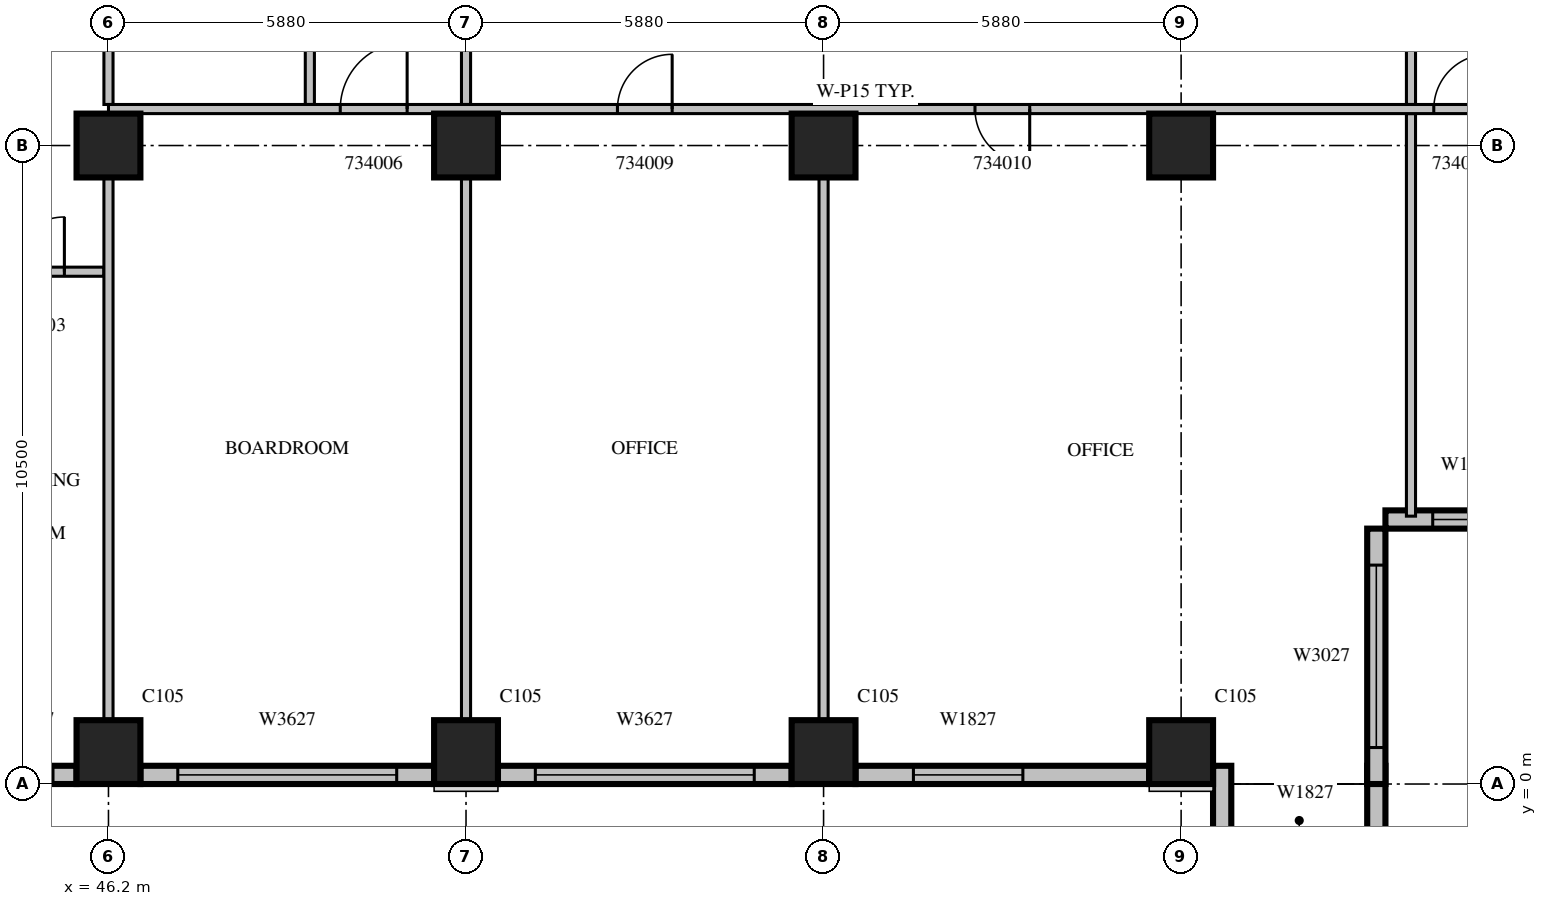
"""IFC4 building model, lengths in metres.
Left out: names, types, materials, properties, quantities, classifications, styles, units other than length and angle.
Written with IfcOpenShell. Run it as: python <this file> out.ifc"""

import sys

from ifc_helpers import new_model, si_unit, direction, frame, frame_2d, origin, origin_2d, place, context, subcontext, project, spatial, rectangle, extrude, source, transform, mapped, element, fill, save


model = new_model("IFC4")
c1 = context("Model", 3, precision=1e-05, world=origin(), true_north=direction((0.0, 1.0)))
c2 = subcontext(c1, "Body", "Model", "MODEL_VIEW")
j1 = project(units=[si_unit("LENGTHUNIT", "METRE"), si_unit("PLANEANGLEUNIT", "RADIAN")], contexts=[c1])
p1 = place(None, origin())
s1 = spatial("IfcSite", under=j1, at=p1, CompositionType="ELEMENT")
p2 = place(p1, origin())
s2 = spatial("IfcBuilding", under=s1, at=p2, CompositionType="ELEMENT")
p3 = place(p2, frame((0.0, 0.0, 153.9)))
s3 = spatial("IfcBuildingStorey", under=s2, at=p3, CompositionType="ELEMENT", Elevation=153.9)
m1 = source(origin(), c2, "Body", "SweptSolid", [
    extrude(rectangle(XDim=1.05, YDim=1.05, at=origin_2d()), origin(), (0.0, 0.0, 1.0), 4.2),
])
for number, where, z_axis, x_axis in (
    (1, (46.2, 0.525, 0.0), (0.0, 0.0, 1.0), (1.0, 0.0, 0.0)),
    (2, (52.08, 0.525, 0.0), (0.0, 0.0, 1.0), (1.0, 0.0, 0.0)),
    (3, (57.96, 0.525, 0.0), (0.0, 0.0, 1.0), (1.0, 0.0, 0.0)),
    (4, (63.84, 0.525, 0.0), (0.0, 0.0, 1.0), (1.0, 0.0, 0.0)),
    (5, (46.2, 10.5, 0.0), (0.0, 0.0, 1.0), (1.0, 0.0, 0.0)),
    (6, (52.08, 10.5, 0.0), (0.0, 0.0, 1.0), (1.0, 0.0, 0.0)),
    (7, (57.96, 10.5, 0.0), (0.0, 0.0, 1.0), (1.0, 0.0, 0.0)),
    (8, (63.84, 10.5, 0.0), (0.0, 0.0, 1.0), (1.0, 0.0, 0.0)),
):
    element("IfcColumn", number, at=place(p3, frame(where, z_axis=z_axis, x_axis=x_axis)), inside=s3, PredefinedType="COLUMN", context=c2, shape_type="MappedRepresentation", body=[
        mapped(m1, transform((0.0, 0.0, 0.0), scale=1.0)),
    ])
m2 = source(origin(), c2, "Body", "SweptSolid", [
    extrude(rectangle(XDim=1.675, YDim=0.3, at=frame_2d((0.838, 0.0))), origin(), (0.0, 0.0, 1.0), 3.8),
])
p4 = place(p3, frame((44.0, 0.15, 0.0), z_axis=(0.0, 0.0, 1.0), x_axis=(1.0, 0.0, 0.0)))
e9 = element("IfcWall", 9, at=p4, inside=s3, PredefinedType="STANDARD", context=c2, shape_type="MappedRepresentation", body=[
    mapped(m2, transform((0.0, 0.0, 0.0), scale=1.0)),
])
m3 = source(origin(), c2, "Body", "SweptSolid", [
    extrude(rectangle(XDim=0.9, YDim=2.7, at=frame_2d((0.45, 1.35))), frame((0.0, 0.16, 0.0), z_axis=(0.0, -1.0, 0.0), x_axis=(1.0, 0.0, 0.0)), (0.0, 0.0, 1.0), 0.32),
])
p5 = place(p4, frame((0.388, 0.0, 0.6)))
e10 = element("IfcOpeningElement", 10, at=p5, cuts=e9, PredefinedType="OPENING", context=c2, shape_type="MappedRepresentation", body=[
    mapped(m3, transform((0.0, 0.0, 0.0), scale=1.0)),
])
m4 = source(origin(), c2, "Body", "SweptSolid", [
    extrude(rectangle(XDim=4.83, YDim=0.3, at=frame_2d((2.415, 0.0))), origin(), (0.0, 0.0, 1.0), 3.8),
])
p6 = place(p3, frame((46.725, 0.15, 0.0), z_axis=(0.0, 0.0, 1.0), x_axis=(1.0, 0.0, 0.0)))
e11 = element("IfcWall", 11, at=p6, inside=s3, PredefinedType="STANDARD", context=c2, shape_type="MappedRepresentation", body=[
    mapped(m4, transform((0.0, 0.0, 0.0), scale=1.0)),
])
m5 = source(origin(), c2, "Body", "SweptSolid", [
    extrude(rectangle(XDim=3.6, YDim=2.7, at=frame_2d((1.8, 1.35))), frame((0.0, 0.16, 0.0), z_axis=(0.0, -1.0, 0.0), x_axis=(1.0, 0.0, 0.0)), (0.0, 0.0, 1.0), 0.32),
])
p7 = place(p6, frame((0.615, 0.0, 0.6)))
e12 = element("IfcOpeningElement", 12, at=p7, cuts=e11, PredefinedType="OPENING", context=c2, shape_type="MappedRepresentation", body=[
    mapped(m5, transform((0.0, 0.0, 0.0), scale=1.0)),
])
p8 = place(p3, frame((52.605, 0.15, 0.0), z_axis=(0.0, 0.0, 1.0), x_axis=(1.0, 0.0, 0.0)))
e13 = element("IfcWall", 13, at=p8, inside=s3, PredefinedType="STANDARD", context=c2, shape_type="MappedRepresentation", body=[
    mapped(m4, transform((0.0, 0.0, 0.0), scale=1.0)),
])
p9 = place(p8, frame((0.615, 0.0, 0.6)))
e14 = element("IfcOpeningElement", 14, at=p9, cuts=e13, PredefinedType="OPENING", context=c2, shape_type="MappedRepresentation", body=[
    mapped(m5, transform((0.0, 0.0, 0.0), scale=1.0)),
])
p10 = place(p3, frame((58.485, 0.15, 0.0), z_axis=(0.0, 0.0, 1.0), x_axis=(1.0, 0.0, 0.0)))
e15 = element("IfcWall", 15, at=p10, inside=s3, PredefinedType="STANDARD", context=c2, shape_type="MappedRepresentation", body=[
    mapped(m4, transform((0.0, 0.0, 0.0), scale=1.0)),
])
m6 = source(origin(), c2, "Body", "SweptSolid", [
    extrude(rectangle(XDim=1.8, YDim=2.7, at=frame_2d((0.9, 1.35))), frame((0.0, 0.16, 0.0), z_axis=(0.0, -1.0, 0.0), x_axis=(1.0, 0.0, 0.0)), (0.0, 0.0, 1.0), 0.32),
])
p11 = place(p10, frame((0.953, 0.0, 0.6)))
e16 = element("IfcOpeningElement", 16, at=p11, cuts=e15, PredefinedType="OPENING", context=c2, shape_type="MappedRepresentation", body=[
    mapped(m6, transform((0.0, 0.0, 0.0), scale=1.0)),
])
m7 = source(origin(), c2, "Body", "SweptSolid", [
    extrude(rectangle(XDim=1.2, YDim=0.3, at=frame_2d((0.6, 0.0))), origin(), (0.0, 0.0, 1.0), 3.8),
])
for number, where, z_axis, x_axis in (
    (17, (64.515, 0.3, 0.0), (0.0, 0.0, 1.0), (0.0, -1.0, 0.0)),
    (18, (67.05, 0.3, 0.0), (0.0, 0.0, 1.0), (0.0, -1.0, 0.0)),
):
    element("IfcWall", number, at=place(p3, frame(where, z_axis=z_axis, x_axis=x_axis)), inside=s3, PredefinedType="STANDARD", context=c2, shape_type="MappedRepresentation", body=[
        mapped(m7, transform((0.0, 0.0, 0.0), scale=1.0)),
    ])
m8 = source(origin(), c2, "Body", "SweptSolid", [
    extrude(rectangle(XDim=4.2, YDim=0.3, at=frame_2d((2.1, 0.0))), origin(), (0.0, 0.0, 1.0), 3.8),
])
p12 = place(p3, frame((67.05, 0.0, 0.0), z_axis=(0.0, 0.0, 1.0), x_axis=(0.0, 1.0, 0.0)))
e19 = element("IfcWall", 19, at=p12, inside=s3, PredefinedType="STANDARD", context=c2, shape_type="MappedRepresentation", body=[
    mapped(m8, transform((0.0, 0.0, 0.0), scale=1.0)),
])
m9 = source(origin(), c2, "Body", "SweptSolid", [
    extrude(rectangle(XDim=3.0, YDim=2.7, at=frame_2d((1.5, 1.35))), frame((0.0, 0.16, 0.0), z_axis=(0.0, -1.0, 0.0), x_axis=(1.0, 0.0, 0.0)), (0.0, 0.0, 1.0), 0.32),
])
p13 = place(p12, frame((0.6, 0.0, 0.6)))
e20 = element("IfcOpeningElement", 20, at=p13, cuts=e19, PredefinedType="OPENING", context=c2, shape_type="MappedRepresentation", body=[
    mapped(m9, transform((0.0, 0.0, 0.0), scale=1.0)),
])
m10 = source(origin(), c2, "Body", "SweptSolid", [
    extrude(rectangle(XDim=2.52, YDim=0.3, at=frame_2d((1.26, 0.0))), origin(), (0.0, 0.0, 1.0), 3.8),
])
p14 = place(p3, frame((67.2, 4.35, 0.0), z_axis=(0.0, 0.0, 1.0), x_axis=(1.0, 0.0, 0.0)))
e21 = element("IfcWall", 21, at=p14, inside=s3, PredefinedType="STANDARD", context=c2, shape_type="MappedRepresentation", body=[
    mapped(m10, transform((0.0, 0.0, 0.0), scale=1.0)),
])
m11 = source(origin(), c2, "Body", "SweptSolid", [
    extrude(rectangle(XDim=1.2, YDim=2.7, at=frame_2d((0.6, 1.35))), frame((0.0, 0.16, 0.0), z_axis=(0.0, -1.0, 0.0), x_axis=(1.0, 0.0, 0.0)), (0.0, 0.0, 1.0), 0.32),
])
p15 = place(p14, frame((0.777, 0.0, 0.6)))
e22 = element("IfcOpeningElement", 22, at=p15, cuts=e21, PredefinedType="OPENING", context=c2, shape_type="MappedRepresentation", body=[
    mapped(m11, transform((0.0, 0.0, 0.0), scale=1.0)),
])
m12 = source(origin(), c2, "Body", "SweptSolid", [
    extrude(rectangle(XDim=2.2, YDim=0.15, at=frame_2d((1.1, 0.0))), origin(), (0.0, 0.0, 1.0), 3.8),
])
p16 = place(p3, frame((46.125, 8.425, 0.0), z_axis=(0.0, 0.0, 1.0), x_axis=(-1.0, 0.0, 0.0)))
e23 = element("IfcWall", 23, at=p16, inside=s3, PredefinedType="PARTITIONING", context=c2, shape_type="MappedRepresentation", body=[
    mapped(m12, transform((0.0, 0.0, 0.0), scale=1.0)),
])
m13 = source(origin(), c2, "Body", "SweptSolid", [
    extrude(rectangle(XDim=0.9, YDim=2.1, at=frame_2d((0.45, 1.05))), frame((0.0, 0.085, 0.0), z_axis=(0.0, -1.0, 0.0), x_axis=(1.0, 0.0, 0.0)), (0.0, 0.0, 1.0), 0.17),
])
p17 = place(p16, frame((0.65, 0.0, 0.0)))
e24 = element("IfcOpeningElement", 24, at=p17, cuts=e23, PredefinedType="OPENING", context=c2, shape_type="MappedRepresentation", body=[
    mapped(m13, transform((0.0, 0.0, 0.0), scale=1.0)),
])
m14 = source(origin(), c2, "Body", "SweptSolid", [
    extrude(rectangle(XDim=3.825, YDim=0.15, at=frame_2d((1.913, 0.0))), origin(), (0.0, 0.0, 1.0), 3.8),
])
p18 = place(p3, frame((49.512, 11.175, 0.0), z_axis=(0.0, 0.0, 1.0), x_axis=(0.0, 1.0, 0.0)))
e25 = element("IfcWall", 25, at=p18, inside=s3, PredefinedType="PARTITIONING", context=c2, shape_type="MappedRepresentation", body=[
    mapped(m14, transform((0.0, 0.0, 0.0), scale=1.0)),
])
m15 = source(origin(), c2, "Body", "SweptSolid", [
    extrude(rectangle(XDim=8.927, YDim=0.15, at=frame_2d((4.463, 0.0))), origin(), (0.0, 0.0, 1.0), 3.8),
])
for number, where, z_axis, x_axis in (
    (26, (57.96, 1.049, 0.0), (0.0, 0.0, 1.0), (0.0, 1.0, 0.0)),
    (27, (46.2, 1.049, 0.0), (0.0, 0.0, 1.0), (0.0, 1.0, 0.0)),
):
    element("IfcWall", number, at=place(p3, frame(where, z_axis=z_axis, x_axis=x_axis)), inside=s3, PredefinedType="PARTITIONING", context=c2, shape_type="MappedRepresentation", body=[
        mapped(m15, transform((0.0, 0.0, 0.0), scale=1.0)),
    ])
p19 = place(p3, frame((46.2, 11.175, 0.0), z_axis=(0.0, 0.0, 1.0), x_axis=(0.0, 1.0, 0.0)))
e28 = element("IfcWall", 28, at=p19, inside=s3, PredefinedType="PARTITIONING", context=c2, shape_type="MappedRepresentation", body=[
    mapped(m14, transform((0.0, 0.0, 0.0), scale=1.0)),
])
p20 = place(p3, frame((52.08, 1.049, 0.0), z_axis=(0.0, 0.0, 1.0), x_axis=(0.0, 1.0, 0.0)))
e29 = element("IfcWall", 29, at=p20, inside=s3, PredefinedType="PARTITIONING", context=c2, shape_type="MappedRepresentation", body=[
    mapped(m15, transform((0.0, 0.0, 0.0), scale=1.0)),
])
p21 = place(p3, frame((52.08, 11.175, 0.0), z_axis=(0.0, 0.0, 1.0), x_axis=(0.0, 1.0, 0.0)))
e30 = element("IfcWall", 30, at=p21, inside=s3, PredefinedType="PARTITIONING", context=c2, shape_type="MappedRepresentation", body=[
    mapped(m14, transform((0.0, 0.0, 0.0), scale=1.0)),
])
m16 = source(origin(), c2, "Body", "SweptSolid", [
    extrude(rectangle(XDim=6.62, YDim=0.15, at=frame_2d((3.31, 0.0))), origin(), (0.0, 0.0, 1.0), 3.8),
])
p22 = place(p3, frame((67.62, 4.405, 0.0), z_axis=(0.0, 0.0, 1.0), x_axis=(0.0, 1.0, 0.0)))
e31 = element("IfcWall", 31, at=p22, inside=s3, PredefinedType="PARTITIONING", context=c2, shape_type="MappedRepresentation", body=[
    mapped(m16, transform((0.0, 0.0, 0.0), scale=1.0)),
])
p23 = place(p3, frame((67.62, 11.175, 0.0), z_axis=(0.0, 0.0, 1.0), x_axis=(0.0, 1.0, 0.0)))
e32 = element("IfcWall", 32, at=p23, inside=s3, PredefinedType="PARTITIONING", context=c2, shape_type="MappedRepresentation", body=[
    mapped(m14, transform((0.0, 0.0, 0.0), scale=1.0)),
])
m17 = source(origin(), c2, "Body", "SweptSolid", [
    extrude(rectangle(XDim=24.9, YDim=0.15, at=frame_2d((12.45, 0.0))), origin(), (0.0, 0.0, 1.0), 3.8),
])
p24 = place(p3, frame((71.1, 11.1, 0.0), z_axis=(0.0, 0.0, 1.0), x_axis=(-1.0, 0.0, 0.0)))
e33 = element("IfcWall", 33, at=p24, inside=s3, PredefinedType="PARTITIONING", context=c2, shape_type="MappedRepresentation", body=[
    mapped(m17, transform((0.0, 0.0, 0.0), scale=1.0)),
])
m18 = source(origin(), c2, "Body", "SweptSolid", [
    extrude(rectangle(XDim=1.1, YDim=2.1, at=frame_2d((0.55, 1.05))), frame((0.0, 0.085, 0.0), z_axis=(0.0, -1.0, 0.0), x_axis=(1.0, 0.0, 0.0)), (0.0, 0.0, 1.0), 0.17),
])
p25 = place(p24, frame((19.988, 0.0, 0.0)))
e34 = element("IfcOpeningElement", 34, at=p25, cuts=e33, PredefinedType="OPENING", context=c2, shape_type="MappedRepresentation", body=[
    mapped(m18, transform((0.0, 0.0, 0.0), scale=1.0)),
])
p26 = place(p24, frame((15.63, 0.0, 0.0)))
e35 = element("IfcOpeningElement", 35, at=p26, cuts=e33, PredefinedType="OPENING", context=c2, shape_type="MappedRepresentation", body=[
    mapped(m13, transform((0.0, 0.0, 0.0), scale=1.0)),
])
p27 = place(p24, frame((9.75, 0.0, 0.0)))
e36 = element("IfcOpeningElement", 36, at=p27, cuts=e33, PredefinedType="OPENING", context=c2, shape_type="MappedRepresentation", body=[
    mapped(m13, transform((0.0, 0.0, 0.0), scale=1.0)),
])
p28 = place(p24, frame((2.205, 0.0, 0.0)))
e37 = element("IfcOpeningElement", 37, at=p28, cuts=e33, PredefinedType="OPENING", context=c2, shape_type="MappedRepresentation", body=[
    mapped(m13, transform((0.0, 0.0, 0.0), scale=1.0)),
])
m19 = source(origin(), c2, "Body", "SweptSolid", [
    extrude(rectangle(XDim=0.9, YDim=2.7, at=frame_2d((0.45, 1.35))), frame((0.0, 0.03, 0.0), z_axis=(0.0, -1.0, 0.0), x_axis=(1.0, 0.0, 0.0)), (0.0, 0.0, 1.0), 0.06),
])
p29 = place(p5, origin())
e38 = element("IfcWindow", 38, at=p29, inside=s3, PartitioningType="SINGLE_PANEL", PredefinedType="WINDOW", context=c2, shape_type="MappedRepresentation", body=[
    mapped(m19, transform((0.0, 0.0, 0.0), scale=1.0)),
])
fill(e10, e38)
m20 = source(origin(), c2, "Body", "SweptSolid", [
    extrude(rectangle(XDim=3.6, YDim=2.7, at=frame_2d((1.8, 1.35))), frame((0.0, 0.03, 0.0), z_axis=(0.0, -1.0, 0.0), x_axis=(1.0, 0.0, 0.0)), (0.0, 0.0, 1.0), 0.06),
])
p30 = place(p7, origin())
e39 = element("IfcWindow", 39, at=p30, inside=s3, PartitioningType="SINGLE_PANEL", PredefinedType="WINDOW", context=c2, shape_type="MappedRepresentation", body=[
    mapped(m20, transform((0.0, 0.0, 0.0), scale=1.0)),
])
fill(e12, e39)
p31 = place(p9, origin())
e40 = element("IfcWindow", 40, at=p31, inside=s3, PartitioningType="SINGLE_PANEL", PredefinedType="WINDOW", context=c2, shape_type="MappedRepresentation", body=[
    mapped(m20, transform((0.0, 0.0, 0.0), scale=1.0)),
])
fill(e14, e40)
m21 = source(origin(), c2, "Body", "SweptSolid", [
    extrude(rectangle(XDim=1.8, YDim=2.7, at=frame_2d((0.9, 1.35))), frame((0.0, 0.03, 0.0), z_axis=(0.0, -1.0, 0.0), x_axis=(1.0, 0.0, 0.0)), (0.0, 0.0, 1.0), 0.06),
])
p32 = place(p11, origin())
e41 = element("IfcWindow", 41, at=p32, inside=s3, PartitioningType="SINGLE_PANEL", PredefinedType="WINDOW", context=c2, shape_type="MappedRepresentation", body=[
    mapped(m21, transform((0.0, 0.0, 0.0), scale=1.0)),
])
fill(e16, e41)
m22 = source(origin(), c2, "Body", "SweptSolid", [
    extrude(rectangle(XDim=3.0, YDim=2.7, at=frame_2d((1.5, 1.35))), frame((0.0, 0.03, 0.0), z_axis=(0.0, -1.0, 0.0), x_axis=(1.0, 0.0, 0.0)), (0.0, 0.0, 1.0), 0.06),
])
p33 = place(p13, origin())
e42 = element("IfcWindow", 42, at=p33, inside=s3, PartitioningType="SINGLE_PANEL", PredefinedType="WINDOW", context=c2, shape_type="MappedRepresentation", body=[
    mapped(m22, transform((0.0, 0.0, 0.0), scale=1.0)),
])
fill(e20, e42)
m23 = source(origin(), c2, "Body", "SweptSolid", [
    extrude(rectangle(XDim=1.2, YDim=2.7, at=frame_2d((0.6, 1.35))), frame((0.0, 0.03, 0.0), z_axis=(0.0, -1.0, 0.0), x_axis=(1.0, 0.0, 0.0)), (0.0, 0.0, 1.0), 0.06),
])
p34 = place(p15, origin())
e43 = element("IfcWindow", 43, at=p34, inside=s3, PartitioningType="SINGLE_PANEL", PredefinedType="WINDOW", context=c2, shape_type="MappedRepresentation", body=[
    mapped(m23, transform((0.0, 0.0, 0.0), scale=1.0)),
])
fill(e22, e43)
m24 = source(origin(), c2, "Body", "SweptSolid", [
    extrude(rectangle(XDim=0.9, YDim=2.1, at=frame_2d((0.45, 1.05))), frame((0.0, 0.025, 0.0), z_axis=(0.0, -1.0, 0.0), x_axis=(1.0, 0.0, 0.0)), (0.0, 0.0, 1.0), 0.05),
])
p35 = place(p17, origin())
e44 = element("IfcDoor", 44, at=p35, inside=s3, OperationType="SINGLE_SWING_RIGHT", PredefinedType="DOOR", context=c2, shape_type="MappedRepresentation", body=[
    mapped(m24, transform((0.0, 0.0, 0.0), scale=1.0)),
])
fill(e24, e44)
m25 = source(origin(), c2, "Body", "SweptSolid", [
    extrude(rectangle(XDim=1.1, YDim=2.1, at=frame_2d((0.55, 1.05))), frame((0.0, 0.025, 0.0), z_axis=(0.0, -1.0, 0.0), x_axis=(1.0, 0.0, 0.0)), (0.0, 0.0, 1.0), 0.05),
])
p36 = place(p25, origin())
e45 = element("IfcDoor", 45, at=p36, inside=s3, OperationType="SINGLE_SWING_RIGHT", PredefinedType="DOOR", context=c2, shape_type="MappedRepresentation", body=[
    mapped(m25, transform((0.0, 0.0, 0.0), scale=1.0)),
])
fill(e34, e45)
p37 = place(p26, origin())
e46 = element("IfcDoor", 46, at=p37, inside=s3, OperationType="SINGLE_SWING_RIGHT", PredefinedType="DOOR", context=c2, shape_type="MappedRepresentation", body=[
    mapped(m24, transform((0.0, 0.0, 0.0), scale=1.0)),
])
fill(e35, e46)
p38 = place(p27, origin())
e47 = element("IfcDoor", 47, at=p38, inside=s3, OperationType="SINGLE_SWING_LEFT", PredefinedType="DOOR", context=c2, shape_type="MappedRepresentation", body=[
    mapped(m24, transform((0.0, 0.0, 0.0), scale=1.0)),
])
fill(e36, e47)
p39 = place(p28, origin())
e48 = element("IfcDoor", 48, at=p39, inside=s3, OperationType="SINGLE_SWING_RIGHT", PredefinedType="DOOR", context=c2, shape_type="MappedRepresentation", body=[
    mapped(m24, transform((0.0, 0.0, 0.0), scale=1.0)),
])
fill(e37, e48)
save(model, sys.argv[1])
